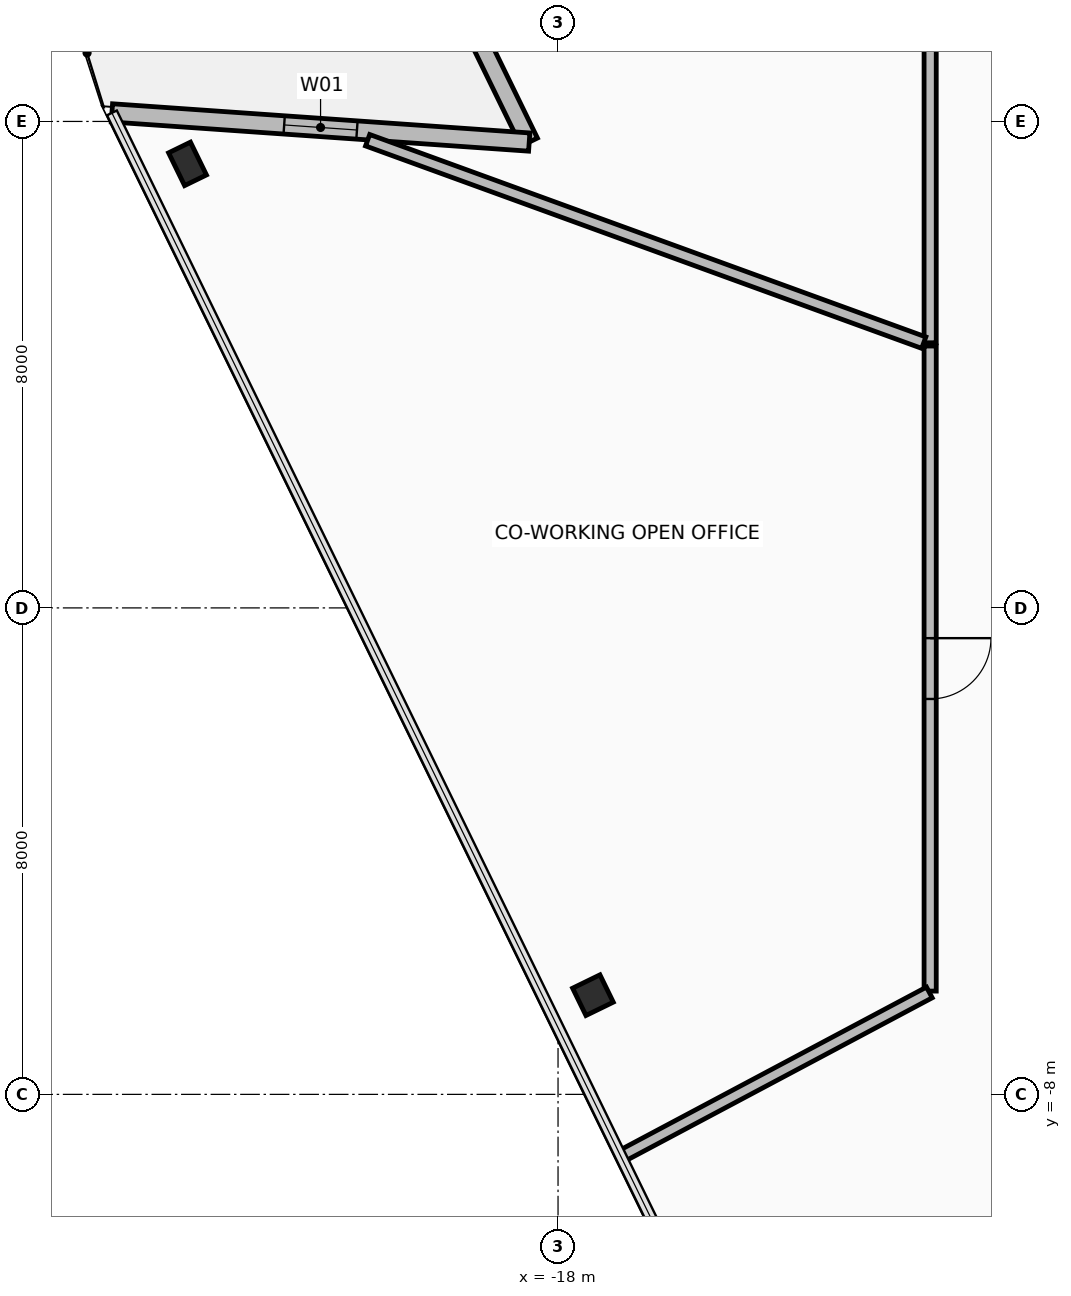
"""IFC4 building model, lengths in metres.
Left out: names, types, materials, properties, quantities, classifications, styles, units other than length and angle.
Written with IfcOpenShell. Run it as: python <this file> out.ifc"""

import sys

from ifc_helpers import new_model, si_unit, direction, frame, frame_2d, origin, origin_2d, place, context, subcontext, project, spatial, rectangle, hollow_rectangle, extrude, element, fill, save


model = new_model("IFC4")
c1 = context("Model", 3, precision=1e-05, world=origin(), true_north=direction((0.0, 1.0)))
c2 = subcontext(c1, "Body", "Model", "MODEL_VIEW")
j1 = project(units=[si_unit("LENGTHUNIT", "METRE"), si_unit("PLANEANGLEUNIT", "RADIAN")], contexts=[c1])
p1 = place(None, origin())
s1 = spatial("IfcSite", under=j1, at=p1, CompositionType="ELEMENT")
p2 = place(p1, origin())
s2 = spatial("IfcBuilding", under=s1, at=p2, CompositionType="ELEMENT")
p3 = place(p2, frame((0.0, 0.0, 234.25)))
s3 = spatial("IfcBuildingStorey", under=s2, at=p3, CompositionType="ELEMENT", Elevation=234.25)
p4 = place(p3, frame((-24.094, 7.302, 0.0), z_axis=(0.0, 0.0, 1.0), x_axis=(-0.438371146789, 0.898794046299, 0.0)))
e1 = element("IfcColumn", 1, at=p4, inside=s3, PredefinedType="COLUMN", context=c2, shape_type="SweptSolid", body=[
    extrude(hollow_rectangle(XDim=0.4, YDim=0.6, WallThickness=0.03, at=origin_2d()), origin(), (0.0, 0.0, 1.0), 3.6),
])
p5 = place(p3, frame((-17.426, -6.369, 0.0), z_axis=(0.0, 0.0, 1.0), x_axis=(-0.438371146789, 0.898794046299, 0.0)))
e2 = element("IfcColumn", 2, at=p5, inside=s3, PredefinedType="COLUMN", context=c2, shape_type="SweptSolid", body=[
    extrude(hollow_rectangle(XDim=0.5, YDim=0.5, WallThickness=0.032, at=origin_2d()), origin(), (0.0, 0.0, 1.0), 3.6),
])
p6 = place(p3, frame((-21.49, 13.844, 0.0), z_axis=(0.0, 0.0, 1.0), x_axis=(0.438391471143, -0.898784133165, 0.0)))
e3 = element("IfcWall", 3, at=p6, inside=s3, PredefinedType="STANDARD", context=c2, shape_type="SweptSolid", body=[
    extrude(rectangle(XDim=6.88, YDim=0.3, at=frame_2d((3.44, 0.0))), origin(), (0.0, 0.0, 1.0), 2.765),
])
p7 = place(p6, frame((3.248, 0.0, 0.0)))
e4 = element("IfcOpeningElement", 4, at=p7, cuts=e3, PredefinedType="OPENING", context=c2, shape_type="SweptSolid", body=[
    extrude(rectangle(XDim=1.1, YDim=2.2, at=frame_2d((0.55, 1.1))), frame((0.0, 0.16, 0.0), z_axis=(0.0, -1.0, 0.0), x_axis=(1.0, 0.0, 0.0)), (0.0, 0.0, 1.0), 0.32),
])
p8 = place(p3, frame((-18.474, 7.661, 0.0), z_axis=(0.0, 0.0, 1.0), x_axis=(-0.997565982203, 0.069728840176, 0.0)))
e5 = element("IfcWall", 5, at=p8, inside=s3, PredefinedType="STANDARD", context=c2, shape_type="SweptSolid", body=[
    extrude(rectangle(XDim=6.88, YDim=0.3, at=frame_2d((3.44, 0.0))), origin(), (0.0, 0.0, 1.0), 2.765),
])
p9 = place(p8, frame((2.84, 0.0, 0.485)))
e6 = element("IfcOpeningElement", 6, at=p9, cuts=e5, PredefinedType="OPENING", context=c2, shape_type="SweptSolid", body=[
    extrude(rectangle(XDim=1.2, YDim=2.1, at=frame_2d((0.6, 1.05))), frame((0.0, 0.16, 0.0), z_axis=(0.0, -1.0, 0.0), x_axis=(1.0, 0.0, 0.0)), (0.0, 0.0, 1.0), 0.32),
])
p10 = place(p3, frame((-11.88, 10.579, 0.0), z_axis=(0.0, 0.0, 1.0), x_axis=(0.0, -1.0, 0.0)))
e7 = element("IfcWall", 7, at=p10, inside=s3, PredefinedType="PARTITIONING", context=c2, shape_type="SweptSolid", body=[
    extrude(rectangle(XDim=6.22, YDim=0.2, at=frame_2d((3.11, 0.0))), origin(), (0.0, 0.0, 1.0), 2.765),
])
p11 = place(p3, frame((-11.985, 4.362, 0.0), z_axis=(0.0, 0.0, 1.0), x_axis=(-0.939690854179, 0.342024996999, 0.0)))
e8 = element("IfcWall", 8, at=p11, inside=s3, PredefinedType="PARTITIONING", context=c2, shape_type="SweptSolid", body=[
    extrude(rectangle(XDim=9.733, YDim=0.2, at=frame_2d((4.867, 0.0))), origin(), (0.0, 0.0, 1.0), 2.915),
])
p12 = place(p3, frame((-11.88, 4.306, 0.0), z_axis=(0.0, 0.0, 1.0), x_axis=(0.0, -1.0, 0.0)))
e9 = element("IfcWall", 9, at=p12, inside=s3, PredefinedType="PARTITIONING", context=c2, shape_type="SweptSolid", body=[
    extrude(rectangle(XDim=10.608, YDim=0.2, at=frame_2d((5.304, 0.0))), origin(), (0.0, 0.0, 1.0), 3.42),
])
p13 = place(p12, frame((4.804, 0.0, 0.0)))
e10 = element("IfcOpeningElement", 10, at=p13, cuts=e9, PredefinedType="OPENING", context=c2, shape_type="SweptSolid", body=[
    extrude(rectangle(XDim=1.0, YDim=2.15, at=frame_2d((0.5, 1.075))), frame((0.0, 0.11, 0.0), z_axis=(0.0, -1.0, 0.0), x_axis=(1.0, 0.0, 0.0)), (0.0, 0.0, 1.0), 0.22),
])
p14 = place(p3, frame((-11.893, -6.324, 0.0), z_axis=(0.0, 0.0, 1.0), x_axis=(-0.882938269224, -0.469489097572, 0.0)))
e11 = element("IfcWall", 11, at=p14, inside=s3, PredefinedType="PARTITIONING", context=c2, shape_type="SweptSolid", body=[
    extrude(rectangle(XDim=5.72, YDim=0.2, at=frame_2d((2.86, 0.0))), origin(), (0.0, 0.0, 1.0), 2.765),
])
p15 = place(p9, origin())
e12 = element("IfcWindow", 12, at=p15, inside=s3, PartitioningType="SINGLE_PANEL", PredefinedType="WINDOW", context=c2, shape_type="SweptSolid", body=[
    extrude(rectangle(XDim=1.2, YDim=2.1, at=frame_2d((0.6, 1.05))), frame((0.0, 0.03, 0.0), z_axis=(0.0, -1.0, 0.0), x_axis=(1.0, 0.0, 0.0)), (0.0, 0.0, 1.0), 0.06),
])
fill(e6, e12)
p16 = place(p13, origin())
e13 = element("IfcDoor", 13, at=p16, inside=s3, OperationType="SINGLE_SWING_RIGHT", PredefinedType="DOOR", context=c2, shape_type="SweptSolid", body=[
    extrude(rectangle(XDim=1.0, YDim=2.15, at=frame_2d((0.5, 1.075))), frame((0.0, 0.025, 0.0), z_axis=(0.0, -1.0, 0.0), x_axis=(1.0, 0.0, 0.0)), (0.0, 0.0, 1.0), 0.05),
])
fill(e10, e13)
save(model, sys.argv[1])
